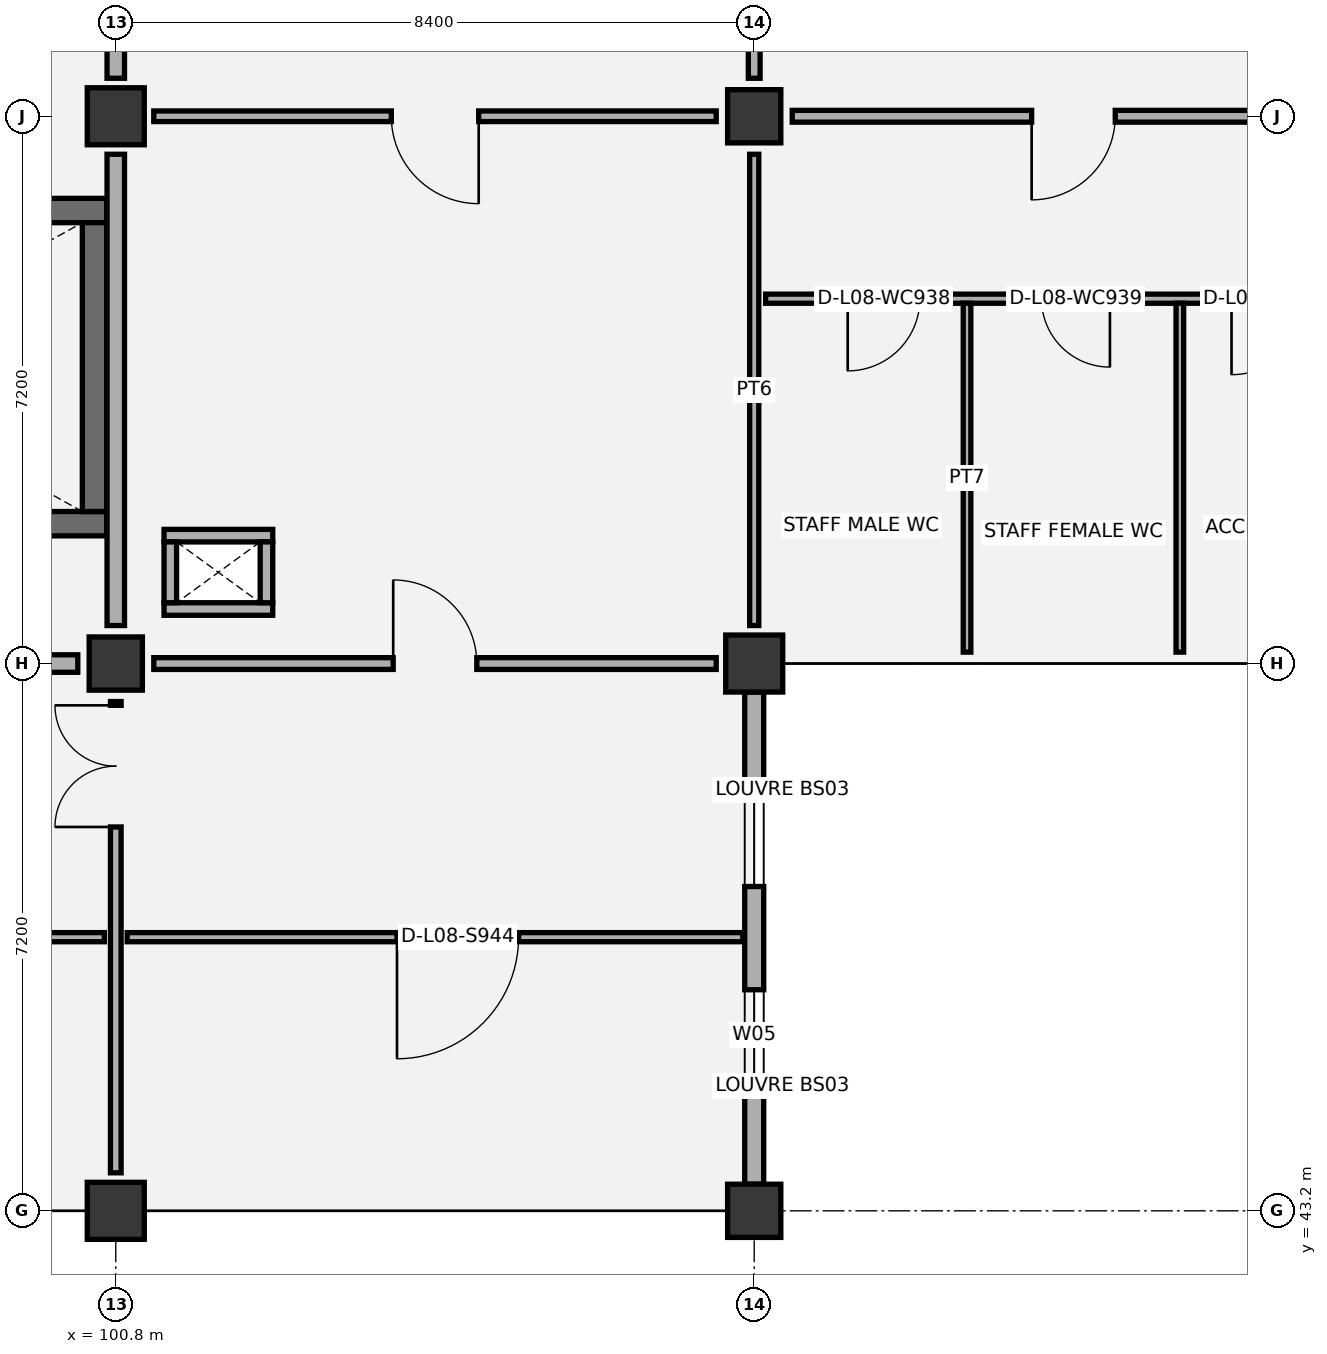
"""IFC4 building model, lengths in metres.
Left out: names, types, materials, properties, quantities, classifications, styles, units other than length and angle.
Written with IfcOpenShell. Run it as: python <this file> out.ifc"""

import sys

from ifc_helpers import new_model, si_unit, direction, frame, frame_2d, origin, origin_2d, place, context, subcontext, project, spatial, rectangle, extrude, element, fill, save


model = new_model("IFC4")
c1 = context("Model", 3, precision=1e-05, world=origin(), true_north=direction((0.0, 1.0)))
c2 = subcontext(c1, "Body", "Model", "MODEL_VIEW")
j1 = project(units=[si_unit("LENGTHUNIT", "METRE"), si_unit("PLANEANGLEUNIT", "RADIAN")], contexts=[c1])
p1 = place(None, origin())
s1 = spatial("IfcSite", under=j1, at=p1, CompositionType="ELEMENT")
p2 = place(p1, origin())
s2 = spatial("IfcBuilding", under=s1, at=p2, CompositionType="ELEMENT")
p3 = place(p2, frame((0.0, 0.0, 39.6)))
s3 = spatial("IfcBuildingStorey", under=s2, at=p3, CompositionType="ELEMENT", Elevation=39.6)
p4 = place(p3, frame((100.8, 43.2, 0.0), z_axis=(0.0, 0.0, 1.0), x_axis=(1.0, 0.0, 0.0)))
e1 = element("IfcColumn", 1, at=p4, inside=s3, PredefinedType="COLUMN", context=c2, shape_type="SweptSolid", body=[
    extrude(rectangle(XDim=0.75, YDim=0.75, at=origin_2d()), origin(), (0.0, 0.0, 1.0), 4.2),
])
p5 = place(p3, frame((100.8, 50.4, 0.0), z_axis=(0.0, 0.0, 1.0), x_axis=(1.0, 0.0, 0.0)))
e2 = element("IfcColumn", 2, at=p5, inside=s3, PredefinedType="COLUMN", context=c2, shape_type="SweptSolid", body=[
    extrude(rectangle(XDim=0.7, YDim=0.7, at=origin_2d()), origin(), (0.0, 0.0, 1.0), 4.2),
])
p6 = place(p3, frame((100.8, 57.6, 0.0), z_axis=(0.0, 0.0, 1.0), x_axis=(1.0, 0.0, 0.0)))
e3 = element("IfcColumn", 3, at=p6, inside=s3, PredefinedType="COLUMN", context=c2, shape_type="SweptSolid", body=[
    extrude(rectangle(XDim=0.75, YDim=0.75, at=origin_2d()), origin(), (0.0, 0.0, 1.0), 4.2),
])
p7 = place(p3, frame((109.2, 43.2, 0.0), z_axis=(0.0, 0.0, 1.0), x_axis=(1.0, 0.0, 0.0)))
e4 = element("IfcColumn", 4, at=p7, inside=s3, PredefinedType="COLUMN", context=c2, shape_type="SweptSolid", body=[
    extrude(rectangle(XDim=0.7, YDim=0.7, at=origin_2d()), origin(), (0.0, 0.0, 1.0), 4.2),
])
p8 = place(p3, frame((109.2, 50.4, 0.0), z_axis=(0.0, 0.0, 1.0), x_axis=(1.0, 0.0, 0.0)))
e5 = element("IfcColumn", 5, at=p8, inside=s3, PredefinedType="COLUMN", context=c2, shape_type="SweptSolid", body=[
    extrude(rectangle(XDim=0.75, YDim=0.75, at=origin_2d()), origin(), (0.0, 0.0, 1.0), 4.2),
])
p9 = place(p3, frame((109.2, 57.6, 0.0), z_axis=(0.0, 0.0, 1.0), x_axis=(1.0, 0.0, 0.0)))
e6 = element("IfcColumn", 6, at=p9, inside=s3, PredefinedType="COLUMN", context=c2, shape_type="SweptSolid", body=[
    extrude(rectangle(XDim=0.7, YDim=0.7, at=origin_2d()), origin(), (0.0, 0.0, 1.0), 4.2),
])
p10 = place(p3, frame((93.2, 52.24, 0.0), z_axis=(0.0, 0.0, 1.0), x_axis=(1.0, 0.0, 0.0)))
e7 = element("IfcWall", 7, at=p10, inside=s3, PredefinedType="SHEAR", context=c2, shape_type="SweptSolid", body=[
    extrude(rectangle(XDim=7.48, YDim=0.32, at=frame_2d((3.74, 0.0))), origin(), (0.0, 0.0, 1.0), 3.9),
])
p11 = place(p10, frame((0.45, 0.0, 0.0)))
e8 = element("IfcOpeningElement", 8, at=p11, cuts=e7, PredefinedType="OPENING", context=c2, shape_type="SweptSolid", body=[
    extrude(rectangle(XDim=1.05, YDim=2.15, at=frame_2d((0.525, 1.075))), frame((0.0, 0.17, 0.0), z_axis=(0.0, -1.0, 0.0), x_axis=(1.0, 0.0, 0.0)), (0.0, 0.0, 1.0), 0.34),
])
p12 = place(p3, frame((93.2, 56.36, 0.0), z_axis=(0.0, 0.0, 1.0), x_axis=(1.0, 0.0, 0.0)))
e9 = element("IfcWall", 9, at=p12, inside=s3, PredefinedType="SHEAR", context=c2, shape_type="SweptSolid", body=[
    extrude(rectangle(XDim=7.48, YDim=0.32, at=frame_2d((3.74, 0.0))), origin(), (0.0, 0.0, 1.0), 3.9),
])
p13 = place(p3, frame((100.52, 52.4, 0.0), z_axis=(0.0, 0.0, 1.0), x_axis=(0.0, 1.0, 0.0)))
e10 = element("IfcWall", 10, at=p13, inside=s3, PredefinedType="SHEAR", context=c2, shape_type="SweptSolid", body=[
    extrude(rectangle(XDim=3.8, YDim=0.32, at=frame_2d((1.9, 0.0))), origin(), (0.0, 0.0, 1.0), 3.9),
])
p14 = place(p3, frame((109.2, 43.55, 0.0), z_axis=(0.0, 0.0, 1.0), x_axis=(0.0, 1.0, 0.0)))
e11 = element("IfcWall", 11, at=p14, inside=s3, PredefinedType="SOLIDWALL", context=c2, shape_type="SweptSolid", body=[
    extrude(rectangle(XDim=6.475, YDim=0.25, at=frame_2d((3.237, 0.0))), origin(), (0.0, 0.0, 1.0), 3.345),
])
p15 = place(p14, frame((1.358, 0.0, 0.9)))
e12 = element("IfcOpeningElement", 12, at=p15, cuts=e11, PredefinedType="OPENING", context=c2, shape_type="SweptSolid", body=[
    extrude(rectangle(XDim=1.2, YDim=1.8, at=frame_2d((0.6, 0.9))), frame((0.0, 0.135, 0.0), z_axis=(0.0, -1.0, 0.0), x_axis=(1.0, 0.0, 0.0)), (0.0, 0.0, 1.0), 0.27),
])
p16 = place(p14, frame((3.917, 0.0, 0.9)))
e13 = element("IfcOpeningElement", 13, at=p16, cuts=e11, PredefinedType="OPENING", context=c2, shape_type="SweptSolid", body=[
    extrude(rectangle(XDim=1.2, YDim=1.8, at=frame_2d((0.6, 0.9))), frame((0.0, 0.135, 0.0), z_axis=(0.0, -1.0, 0.0), x_axis=(1.0, 0.0, 0.0)), (0.0, 0.0, 1.0), 0.27),
])
for number, where, z_axis, x_axis in (
    (14, (101.435, 51.117, 0.0), (0.0, 0.0, 1.0), (1.0, 0.0, 0.0)),
    (15, (101.435, 52.083, 0.0), (0.0, 0.0, 1.0), (1.0, 0.0, 0.0)),
):
    element("IfcWall", number, at=place(p3, frame(where, z_axis=z_axis, x_axis=x_axis)), inside=s3, PredefinedType="PARTITIONING", context=c2, shape_type="SweptSolid", body=[
        extrude(rectangle(XDim=1.43, YDim=0.165, at=frame_2d((0.715, 0.0))), origin(), (0.0, 0.0, 1.0), 3.85),
    ])
for number, where, z_axis, x_axis in (
    (16, (101.518, 51.2, 0.0), (0.0, 0.0, 1.0), (0.0, 1.0, 0.0)),
    (17, (102.782, 51.2, 0.0), (0.0, 0.0, 1.0), (0.0, 1.0, 0.0)),
):
    element("IfcWall", number, at=place(p3, frame(where, z_axis=z_axis, x_axis=x_axis)), inside=s3, PredefinedType="PARTITIONING", context=c2, shape_type="SweptSolid", body=[
        extrude(rectangle(XDim=0.8, YDim=0.165, at=frame_2d((0.4, 0.0))), origin(), (0.0, 0.0, 1.0), 3.85),
    ])
p17 = place(p3, frame((109.35, 55.2, 0.0), z_axis=(0.0, 0.0, 1.0), x_axis=(1.0, 0.0, 0.0)))
e18 = element("IfcWall", 18, at=p17, inside=s3, PredefinedType="PARTITIONING", context=c2, shape_type="SweptSolid", body=[
    extrude(rectangle(XDim=8.1, YDim=0.12, at=frame_2d((4.05, 0.0))), origin(), (0.0, 0.0, 1.0), 3.9),
])
p18 = place(p17, frame((1.08, 0.0, 0.0)))
e19 = element("IfcOpeningElement", 19, at=p18, cuts=e18, PredefinedType="OPENING", context=c2, shape_type="SweptSolid", body=[
    extrude(rectangle(XDim=0.95, YDim=2.1, at=frame_2d((0.475, 1.05))), frame((0.0, 0.07, 0.0), z_axis=(0.0, -1.0, 0.0), x_axis=(1.0, 0.0, 0.0)), (0.0, 0.0, 1.0), 0.14),
])
p19 = place(p17, frame((3.63, 0.0, 0.0)))
e20 = element("IfcOpeningElement", 20, at=p19, cuts=e18, PredefinedType="OPENING", context=c2, shape_type="SweptSolid", body=[
    extrude(rectangle(XDim=0.9, YDim=2.1, at=frame_2d((0.45, 1.05))), frame((0.0, 0.07, 0.0), z_axis=(0.0, -1.0, 0.0), x_axis=(1.0, 0.0, 0.0)), (0.0, 0.0, 1.0), 0.14),
])
p20 = place(p17, frame((6.13, 0.0, 0.0)))
e21 = element("IfcOpeningElement", 21, at=p20, cuts=e18, PredefinedType="OPENING", context=c2, shape_type="SweptSolid", body=[
    extrude(rectangle(XDim=1.0, YDim=2.1, at=frame_2d((0.5, 1.05))), frame((0.0, 0.07, 0.0), z_axis=(0.0, -1.0, 0.0), x_axis=(1.0, 0.0, 0.0)), (0.0, 0.0, 1.0), 0.14),
])
for number, where, z_axis, x_axis in (
    (22, (112.0, 50.55, 0.0), (0.0, 0.0, 1.0), (0.0, 1.0, 0.0)),
    (23, (114.8, 50.55, 0.0), (0.0, 0.0, 1.0), (0.0, 1.0, 0.0)),
):
    element("IfcWall", number, at=place(p3, frame(where, z_axis=z_axis, x_axis=x_axis)), inside=s3, PredefinedType="PARTITIONING", context=c2, shape_type="SweptSolid", body=[
        extrude(rectangle(XDim=4.59, YDim=0.1, at=frame_2d((2.295, 0.0))), origin(), (0.0, 0.0, 1.0), 3.9),
    ])
p21 = place(p3, frame((92.55, 46.8, 0.0), z_axis=(0.0, 0.0, 1.0), x_axis=(1.0, 0.0, 0.0)))
e24 = element("IfcWall", 24, at=p21, inside=s3, PredefinedType="PARTITIONING", context=c2, shape_type="SweptSolid", body=[
    extrude(rectangle(XDim=8.1, YDim=0.12, at=frame_2d((4.05, 0.0))), origin(), (0.0, 0.0, 1.0), 3.9),
])
p22 = place(p21, frame((3.55, 0.0, 0.0)))
e25 = element("IfcOpeningElement", 25, at=p22, cuts=e24, PredefinedType="OPENING", context=c2, shape_type="SweptSolid", body=[
    extrude(rectangle(XDim=1.6, YDim=2.2, at=frame_2d((0.8, 1.1))), frame((0.0, 0.07, 0.0), z_axis=(0.0, -1.0, 0.0), x_axis=(1.0, 0.0, 0.0)), (0.0, 0.0, 1.0), 0.14),
])
p23 = place(p3, frame((100.95, 46.8, 0.0), z_axis=(0.0, 0.0, 1.0), x_axis=(1.0, 0.0, 0.0)))
e26 = element("IfcWall", 26, at=p23, inside=s3, PredefinedType="PARTITIONING", context=c2, shape_type="SweptSolid", body=[
    extrude(rectangle(XDim=8.1, YDim=0.12, at=frame_2d((4.05, 0.0))), origin(), (0.0, 0.0, 1.0), 3.9),
])
p24 = place(p23, frame((3.55, 0.0, 0.0)))
e27 = element("IfcOpeningElement", 27, at=p24, cuts=e26, PredefinedType="OPENING", context=c2, shape_type="SweptSolid", body=[
    extrude(rectangle(XDim=1.6, YDim=2.2, at=frame_2d((0.8, 1.1))), frame((0.0, 0.07, 0.0), z_axis=(0.0, -1.0, 0.0), x_axis=(1.0, 0.0, 0.0)), (0.0, 0.0, 1.0), 0.14),
])
p25 = place(p3, frame((100.8, 43.7, 0.0), z_axis=(0.0, 0.0, 1.0), x_axis=(0.0, 1.0, 0.0)))
e28 = element("IfcWall", 28, at=p25, inside=s3, PredefinedType="PARTITIONING", context=c2, shape_type="SweptSolid", body=[
    extrude(rectangle(XDim=6.2, YDim=0.14, at=frame_2d((3.1, 0.0))), origin(), (0.0, 0.0, 1.0), 3.605),
])
p26 = place(p25, frame((4.55, 0.0, 0.0)))
e29 = element("IfcOpeningElement", 29, at=p26, cuts=e28, PredefinedType="OPENING", context=c2, shape_type="SweptSolid", body=[
    extrude(rectangle(XDim=1.6, YDim=2.2, at=frame_2d((0.8, 1.1))), frame((0.0, 0.08, 0.0), z_axis=(0.0, -1.0, 0.0), x_axis=(1.0, 0.0, 0.0)), (0.0, 0.0, 1.0), 0.16),
])
p27 = place(p3, frame((92.9, 50.4, 0.0), z_axis=(0.0, 0.0, 1.0), x_axis=(1.0, 0.0, 0.0)))
e30 = element("IfcWall", 30, at=p27, inside=s3, PredefinedType="PARTITIONING", context=c2, shape_type="SweptSolid", body=[
    extrude(rectangle(XDim=7.4, YDim=0.23, at=frame_2d((3.7, 0.0))), origin(), (0.0, 0.0, 1.0), 3.295),
])
p28 = place(p27, frame((2.95, 0.0, 0.0)))
e31 = element("IfcOpeningElement", 31, at=p28, cuts=e30, PredefinedType="OPENING", context=c2, shape_type="SweptSolid", body=[
    extrude(rectangle(XDim=1.5, YDim=2.15, at=frame_2d((0.75, 1.075))), frame((0.0, 0.125, 0.0), z_axis=(0.0, -1.0, 0.0), x_axis=(1.0, 0.0, 0.0)), (0.0, 0.0, 1.0), 0.25),
])
p29 = place(p3, frame((100.8, 50.9, 0.0), z_axis=(0.0, 0.0, 1.0), x_axis=(0.0, 1.0, 0.0)))
e32 = element("IfcWall", 32, at=p29, inside=s3, PredefinedType="PARTITIONING", context=c2, shape_type="SweptSolid", body=[
    extrude(rectangle(XDim=6.2, YDim=0.23, at=frame_2d((3.1, 0.0))), origin(), (0.0, 0.0, 1.0), 3.345),
])
p30 = place(p3, frame((100.8, 58.1, 0.0), z_axis=(0.0, 0.0, 1.0), x_axis=(0.0, 1.0, 0.0)))
e33 = element("IfcWall", 33, at=p30, inside=s3, PredefinedType="PARTITIONING", context=c2, shape_type="SweptSolid", body=[
    extrude(rectangle(XDim=6.2, YDim=0.23, at=frame_2d((3.1, 0.0))), origin(), (0.0, 0.0, 1.0), 3.395),
])
p31 = place(p3, frame((101.3, 50.4, 0.0), z_axis=(0.0, 0.0, 1.0), x_axis=(1.0, 0.0, 0.0)))
e34 = element("IfcWall", 34, at=p31, inside=s3, PredefinedType="PARTITIONING", context=c2, shape_type="SweptSolid", body=[
    extrude(rectangle(XDim=7.4, YDim=0.155, at=frame_2d((3.7, 0.0))), origin(), (0.0, 0.0, 1.0), 3.295),
])
p32 = place(p31, frame((3.15, 0.0, 0.0)))
e35 = element("IfcOpeningElement", 35, at=p32, cuts=e34, PredefinedType="OPENING", context=c2, shape_type="SweptSolid", body=[
    extrude(rectangle(XDim=1.1, YDim=2.1, at=frame_2d((0.55, 1.05))), frame((0.0, 0.087, 0.0), z_axis=(0.0, -1.0, 0.0), x_axis=(1.0, 0.0, 0.0)), (0.0, 0.0, 1.0), 0.175),
])
p33 = place(p3, frame((109.2, 50.9, 0.0), z_axis=(0.0, 0.0, 1.0), x_axis=(0.0, 1.0, 0.0)))
e36 = element("IfcWall", 36, at=p33, inside=s3, PredefinedType="PARTITIONING", context=c2, shape_type="SweptSolid", body=[
    extrude(rectangle(XDim=6.2, YDim=0.12, at=frame_2d((3.1, 0.0))), origin(), (0.0, 0.0, 1.0), 3.395),
])
p34 = place(p3, frame((101.3, 57.6, 0.0), z_axis=(0.0, 0.0, 1.0), x_axis=(1.0, 0.0, 0.0)))
e37 = element("IfcWall", 37, at=p34, inside=s3, PredefinedType="PARTITIONING", context=c2, shape_type="SweptSolid", body=[
    extrude(rectangle(XDim=7.4, YDim=0.14, at=frame_2d((3.7, 0.0))), origin(), (0.0, 0.0, 1.0), 3.295),
])
p35 = place(p34, frame((3.125, 0.0, 0.0)))
e38 = element("IfcOpeningElement", 38, at=p35, cuts=e37, PredefinedType="OPENING", context=c2, shape_type="SweptSolid", body=[
    extrude(rectangle(XDim=1.15, YDim=2.1, at=frame_2d((0.575, 1.05))), frame((0.0, 0.08, 0.0), z_axis=(0.0, -1.0, 0.0), x_axis=(1.0, 0.0, 0.0)), (0.0, 0.0, 1.0), 0.16),
])
p36 = place(p3, frame((109.2, 58.1, 0.0), z_axis=(0.0, 0.0, 1.0), x_axis=(0.0, 1.0, 0.0)))
e39 = element("IfcWall", 39, at=p36, inside=s3, PredefinedType="PARTITIONING", context=c2, shape_type="SweptSolid", body=[
    extrude(rectangle(XDim=6.2, YDim=0.155, at=frame_2d((3.1, 0.0))), origin(), (0.0, 0.0, 1.0), 3.345),
])
p37 = place(p36, frame((2.55, 0.0, 0.0)))
e40 = element("IfcOpeningElement", 40, at=p37, cuts=e39, PredefinedType="OPENING", context=c2, shape_type="SweptSolid", body=[
    extrude(rectangle(XDim=1.1, YDim=2.1, at=frame_2d((0.55, 1.05))), frame((0.0, 0.087, 0.0), z_axis=(0.0, -1.0, 0.0), x_axis=(1.0, 0.0, 0.0)), (0.0, 0.0, 1.0), 0.175),
])
p38 = place(p3, frame((109.7, 57.6, 0.0), z_axis=(0.0, 0.0, 1.0), x_axis=(1.0, 0.0, 0.0)))
e41 = element("IfcWall", 41, at=p38, inside=s3, PredefinedType="PARTITIONING", context=c2, shape_type="SweptSolid", body=[
    extrude(rectangle(XDim=7.4, YDim=0.155, at=frame_2d((3.7, 0.0))), origin(), (0.0, 0.0, 1.0), 3.295),
])
p39 = place(p38, frame((3.15, 0.0, 0.0)))
e42 = element("IfcOpeningElement", 42, at=p39, cuts=e41, PredefinedType="OPENING", context=c2, shape_type="SweptSolid", body=[
    extrude(rectangle(XDim=1.1, YDim=2.1, at=frame_2d((0.55, 1.05))), frame((0.0, 0.087, 0.0), z_axis=(0.0, -1.0, 0.0), x_axis=(1.0, 0.0, 0.0)), (0.0, 0.0, 1.0), 0.175),
])
p40 = place(p15, origin())
e43 = element("IfcWindow", 43, at=p40, inside=s3, PartitioningType="SINGLE_PANEL", PredefinedType="WINDOW", context=c2, shape_type="SweptSolid", body=[
    extrude(rectangle(XDim=1.2, YDim=1.8, at=frame_2d((0.6, 0.9))), frame((0.0, 0.03, 0.0), z_axis=(0.0, -1.0, 0.0), x_axis=(1.0, 0.0, 0.0)), (0.0, 0.0, 1.0), 0.06),
])
fill(e12, e43)
p41 = place(p16, origin())
e44 = element("IfcWindow", 44, at=p41, inside=s3, PartitioningType="SINGLE_PANEL", PredefinedType="WINDOW", context=c2, shape_type="SweptSolid", body=[
    extrude(rectangle(XDim=1.2, YDim=1.8, at=frame_2d((0.6, 0.9))), frame((0.0, 0.03, 0.0), z_axis=(0.0, -1.0, 0.0), x_axis=(1.0, 0.0, 0.0)), (0.0, 0.0, 1.0), 0.06),
])
fill(e13, e44)
p42 = place(p18, frame((0.95, 0.0, 0.0), z_axis=(0.0, 0.0, 1.0), x_axis=(-1.0, 0.0, 0.0)))
e45 = element("IfcDoor", 45, at=p42, inside=s3, OperationType="SINGLE_SWING_RIGHT", PredefinedType="DOOR", context=c2, shape_type="SweptSolid", body=[
    extrude(rectangle(XDim=0.95, YDim=2.1, at=frame_2d((0.475, 1.05))), frame((0.0, 0.025, 0.0), z_axis=(0.0, -1.0, 0.0), x_axis=(1.0, 0.0, 0.0)), (0.0, 0.0, 1.0), 0.05),
])
fill(e19, e45)
p43 = place(p19, frame((0.9, 0.0, 0.0), z_axis=(0.0, 0.0, 1.0), x_axis=(-1.0, 0.0, 0.0)))
e46 = element("IfcDoor", 46, at=p43, inside=s3, OperationType="SINGLE_SWING_LEFT", PredefinedType="DOOR", context=c2, shape_type="SweptSolid", body=[
    extrude(rectangle(XDim=0.9, YDim=2.1, at=frame_2d((0.45, 1.05))), frame((0.0, 0.025, 0.0), z_axis=(0.0, -1.0, 0.0), x_axis=(1.0, 0.0, 0.0)), (0.0, 0.0, 1.0), 0.05),
])
fill(e20, e46)
p44 = place(p20, frame((1.0, 0.0, 0.0), z_axis=(0.0, 0.0, 1.0), x_axis=(-1.0, 0.0, 0.0)))
e47 = element("IfcDoor", 47, at=p44, inside=s3, OperationType="SINGLE_SWING_RIGHT", PredefinedType="DOOR", context=c2, shape_type="SweptSolid", body=[
    extrude(rectangle(XDim=1.0, YDim=2.1, at=frame_2d((0.5, 1.05))), frame((0.0, 0.025, 0.0), z_axis=(0.0, -1.0, 0.0), x_axis=(1.0, 0.0, 0.0)), (0.0, 0.0, 1.0), 0.05),
])
fill(e21, e47)
p45 = place(p24, frame((1.6, 0.0, 0.0), z_axis=(0.0, 0.0, 1.0), x_axis=(-1.0, 0.0, 0.0)))
e48 = element("IfcDoor", 48, at=p45, inside=s3, OperationType="SINGLE_SWING_RIGHT", PredefinedType="DOOR", context=c2, shape_type="SweptSolid", body=[
    extrude(rectangle(XDim=1.6, YDim=2.2, at=frame_2d((0.8, 1.1))), frame((0.0, 0.025, 0.0), z_axis=(0.0, -1.0, 0.0), x_axis=(1.0, 0.0, 0.0)), (0.0, 0.0, 1.0), 0.05),
])
fill(e27, e48)
p46 = place(p26, origin())
e49 = element("IfcDoor", 49, at=p46, inside=s3, OperationType="DOUBLE_DOOR_SINGLE_SWING", PredefinedType="DOOR", context=c2, shape_type="SweptSolid", body=[
    extrude(rectangle(XDim=1.6, YDim=2.2, at=frame_2d((0.8, 1.1))), frame((0.0, 0.025, 0.0), z_axis=(0.0, -1.0, 0.0), x_axis=(1.0, 0.0, 0.0)), (0.0, 0.0, 1.0), 0.05),
])
fill(e29, e49)
p47 = place(p32, origin())
e50 = element("IfcDoor", 50, at=p47, inside=s3, OperationType="SINGLE_SWING_LEFT", PredefinedType="DOOR", context=c2, shape_type="SweptSolid", body=[
    extrude(rectangle(XDim=1.1, YDim=2.1, at=frame_2d((0.55, 1.05))), frame((0.0, 0.025, 0.0), z_axis=(0.0, -1.0, 0.0), x_axis=(1.0, 0.0, 0.0)), (0.0, 0.0, 1.0), 0.05),
])
fill(e35, e50)
p48 = place(p35, frame((1.15, 0.0, 0.0), z_axis=(0.0, 0.0, 1.0), x_axis=(-1.0, 0.0, 0.0)))
e51 = element("IfcDoor", 51, at=p48, inside=s3, OperationType="SINGLE_SWING_LEFT", PredefinedType="DOOR", context=c2, shape_type="SweptSolid", body=[
    extrude(rectangle(XDim=1.15, YDim=2.1, at=frame_2d((0.575, 1.05))), frame((0.0, 0.025, 0.0), z_axis=(0.0, -1.0, 0.0), x_axis=(1.0, 0.0, 0.0)), (0.0, 0.0, 1.0), 0.05),
])
fill(e38, e51)
p49 = place(p39, frame((1.1, 0.0, 0.0), z_axis=(0.0, 0.0, 1.0), x_axis=(-1.0, 0.0, 0.0)))
e52 = element("IfcDoor", 52, at=p49, inside=s3, OperationType="SINGLE_SWING_RIGHT", PredefinedType="DOOR", context=c2, shape_type="SweptSolid", body=[
    extrude(rectangle(XDim=1.1, YDim=2.1, at=frame_2d((0.55, 1.05))), frame((0.0, 0.025, 0.0), z_axis=(0.0, -1.0, 0.0), x_axis=(1.0, 0.0, 0.0)), (0.0, 0.0, 1.0), 0.05),
])
fill(e42, e52)
save(model, sys.argv[1])
